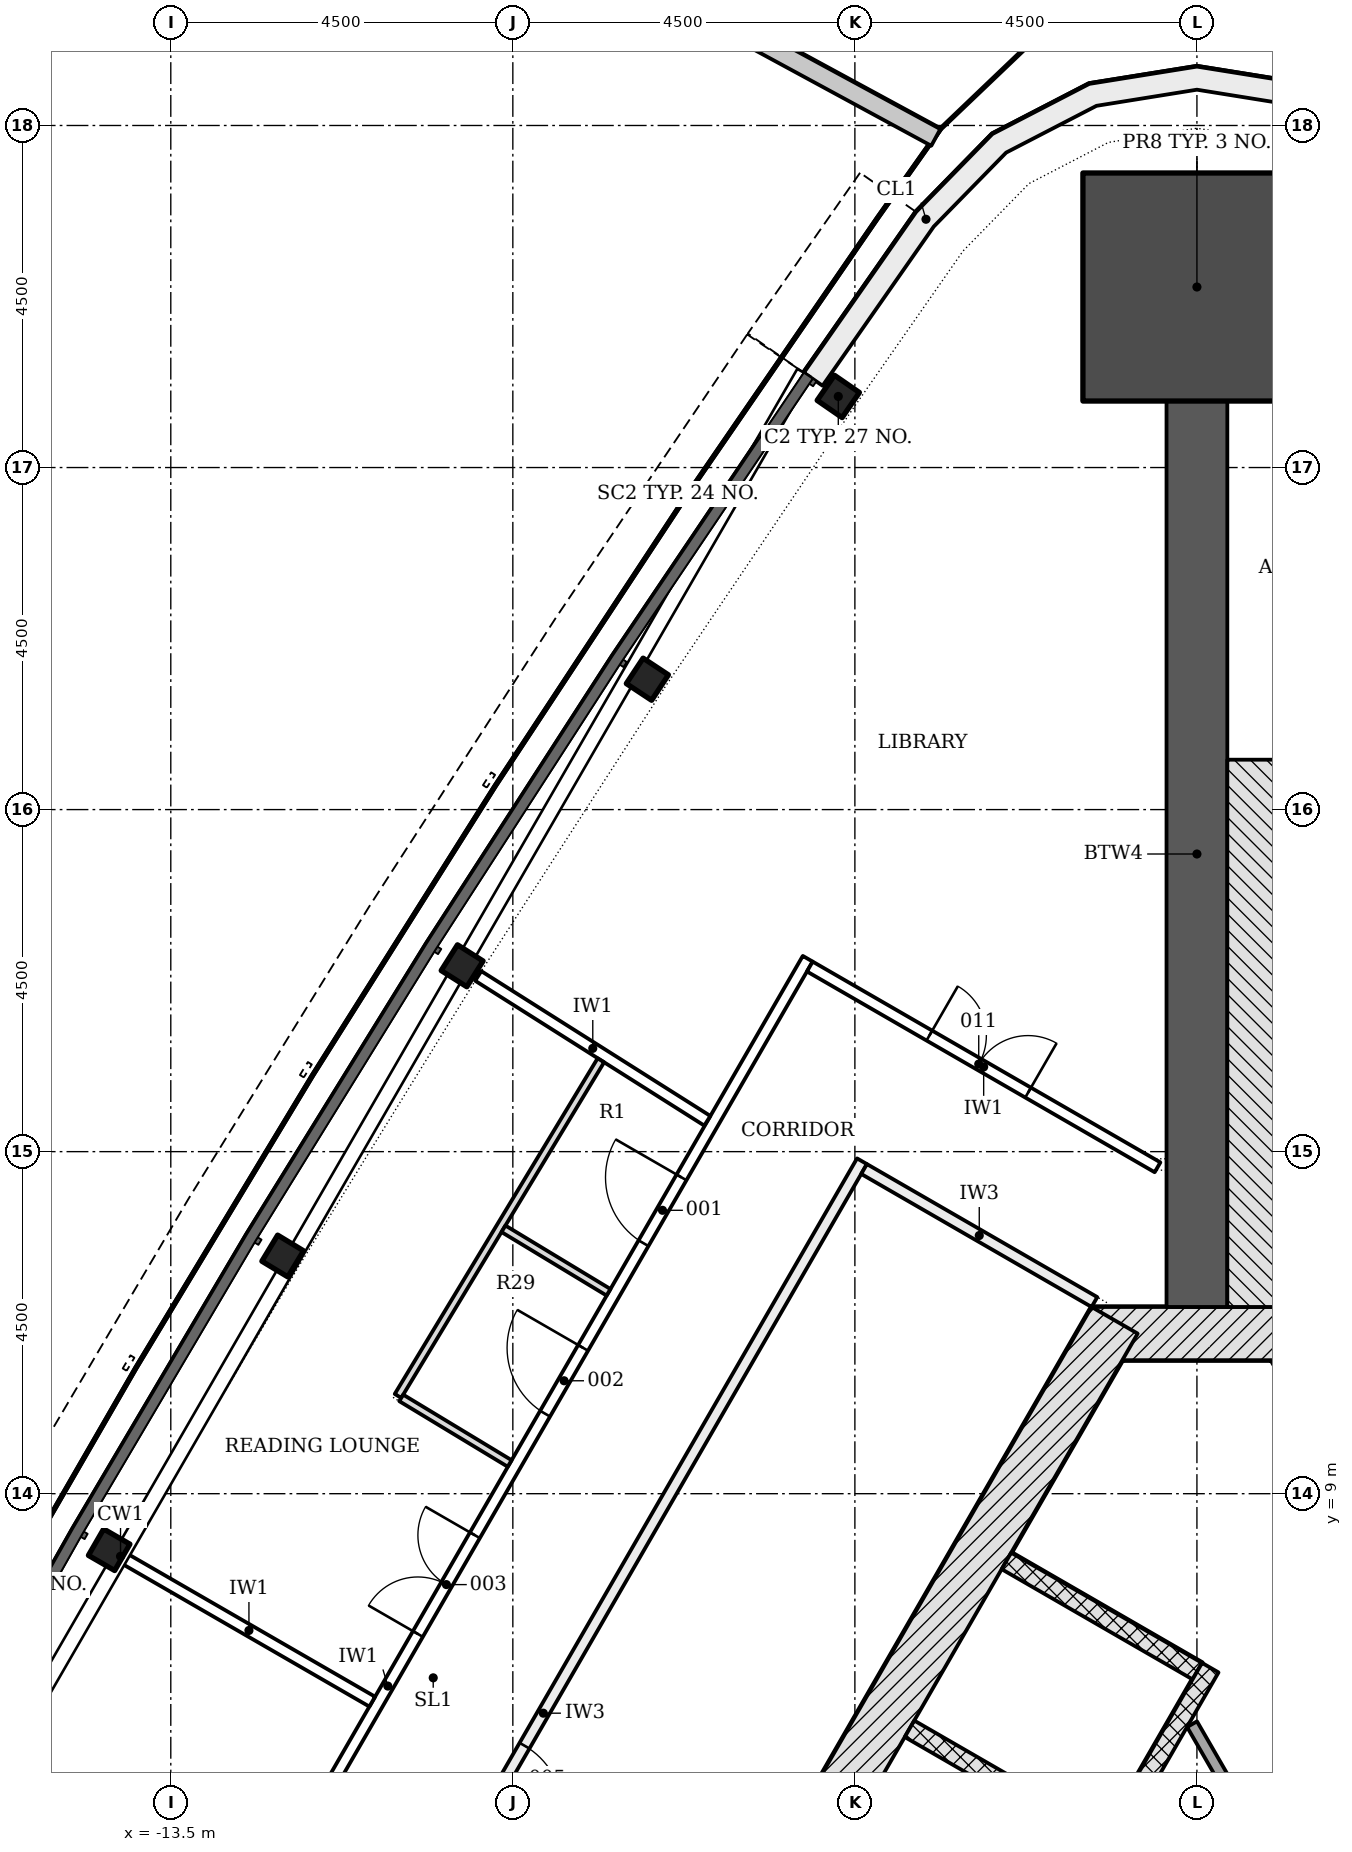
"""IFC4 building model, lengths in metres.
Left out: names, types, materials, properties, quantities, classifications, styles, units other than length and angle.
Written with IfcOpenShell. Run it as: python <this file> out.ifc"""

import sys

from ifc_helpers import new_model, si_unit, direction, frame, frame_2d, origin, origin_2d, place, context, subcontext, project, spatial, polyline, rectangle, i_section, outline, extrude, element, fill, save


model = new_model("IFC4")
c1 = context("Model", 3, precision=1e-05, world=origin(), true_north=direction((0.0, 1.0)))
c2 = subcontext(c1, "Body", "Model", "MODEL_VIEW")
j1 = project(units=[si_unit("LENGTHUNIT", "METRE"), si_unit("PLANEANGLEUNIT", "RADIAN")], contexts=[c1])
p1 = place(None, origin())
s1 = spatial("IfcSite", under=j1, at=p1, CompositionType="ELEMENT")
p2 = place(p1, origin())
s2 = spatial("IfcBuilding", under=s1, at=p2, CompositionType="ELEMENT")
p3 = place(p2, frame((0.0, 0.0, 105.9)))
s3 = spatial("IfcBuildingStorey", under=s2, at=p3, CompositionType="ELEMENT", Elevation=105.9)
p4 = place(p3, frame((10.311, -4.703, -0.2), z_axis=(0.0, 0.0, 1.0), x_axis=(-0.500001446645, 0.866024568562, 0.0)))
e1 = element("IfcWall", 1, at=p4, inside=s3, PredefinedType="SHEAR", context=c2, shape_type="SweptSolid", body=[
    extrude(rectangle(XDim=18.458, YDim=0.7, at=frame_2d((9.229, 0.0))), origin(), (0.0, 0.0, 1.0), 3.6),
])
p5 = place(p4, frame((10.5, 0.0, 0.2)))
e2 = element("IfcOpeningElement", 2, at=p5, cuts=e1, PredefinedType="OPENING", context=c2, shape_type="SweptSolid", body=[
    extrude(rectangle(XDim=1.0, YDim=2.1, at=frame_2d((0.5, 1.05))), frame((0.0, 0.36, 0.0), z_axis=(0.0, -1.0, 0.0), x_axis=(1.0, 0.0, 0.0)), (0.0, 0.0, 1.0), 0.72),
])
p6 = place(p4, frame((4.877, 0.0, 0.2)))
e3 = element("IfcOpeningElement", 3, at=p6, cuts=e1, PredefinedType="OPENING", context=c2, shape_type="SweptSolid", body=[
    extrude(rectangle(XDim=0.9, YDim=2.1, at=frame_2d((0.45, 1.05))), frame((0.0, 0.36, 0.0), z_axis=(0.0, -1.0, 0.0), x_axis=(1.0, 0.0, 0.0)), (0.0, 0.0, 1.0), 0.72),
])
p7 = place(p4, frame((14.452, 0.0, 0.2)))
e4 = element("IfcOpeningElement", 4, at=p7, cuts=e1, PredefinedType="OPENING", context=c2, shape_type="SweptSolid", body=[
    extrude(rectangle(XDim=0.9, YDim=2.1, at=frame_2d((0.45, 1.05))), frame((0.0, 0.36, 0.0), z_axis=(0.0, -1.0, 0.0), x_axis=(1.0, 0.0, 0.0)), (0.0, 0.0, 1.0), 0.72),
])
p8 = place(p3, frame((1.386, 11.106, -0.2), z_axis=(0.0, 0.0, 1.0), x_axis=(-1.0, 0.0, 0.0)))
e5 = element("IfcWall", 5, at=p8, inside=s3, PredefinedType="SHEAR", context=c2, shape_type="SweptSolid", body=[
    extrude(rectangle(XDim=2.771, YDim=0.7, at=frame_2d((1.386, 0.0))), origin(), (0.0, 0.0, 1.0), 3.6),
])
p9 = place(p3, frame((-1.083, 11.281, -0.2), z_axis=(0.0, 0.0, 1.0), x_axis=(-0.500001446645, -0.866024568562, 0.0)))
e6 = element("IfcWall", 6, at=p9, inside=s3, PredefinedType="SHEAR", context=c2, shape_type="SweptSolid", body=[
    extrude(rectangle(XDim=18.458, YDim=0.7, at=frame_2d((9.229, 0.0))), origin(), (0.0, 0.0, 1.0), 3.6),
])
p10 = place(p9, frame((8.979, 0.0, 0.2)))
e7 = element("IfcOpeningElement", 7, at=p10, cuts=e6, PredefinedType="OPENING", context=c2, shape_type="SweptSolid", body=[
    extrude(rectangle(XDim=1.2, YDim=2.1, at=frame_2d((0.6, 1.05))), frame((0.0, 0.36, 0.0), z_axis=(0.0, -1.0, 0.0), x_axis=(1.0, 0.0, 0.0)), (0.0, 0.0, 1.0), 0.72),
])
p11 = place(p9, frame((11.029, 0.0, 0.2)))
e8 = element("IfcOpeningElement", 8, at=p11, cuts=e6, PredefinedType="OPENING", context=c2, shape_type="SweptSolid", body=[
    extrude(rectangle(XDim=1.2, YDim=2.1, at=frame_2d((0.6, 1.05))), frame((0.0, 0.36, 0.0), z_axis=(0.0, -1.0, 0.0), x_axis=(1.0, 0.0, 0.0)), (0.0, 0.0, 1.0), 0.72),
])
p12 = place(p3, frame((0.0, 11.456, -0.2), z_axis=(0.0, 0.0, 1.0), x_axis=(0.0, 1.0, 0.0)))
e9 = element("IfcWall", 9, at=p12, inside=s3, PredefinedType="SHEAR", context=c2, shape_type="SweptSolid", body=[
    extrude(rectangle(XDim=11.919, YDim=0.8, at=frame_2d((5.959, 0.0))), origin(), (0.0, 0.0, 1.0), 3.6),
])
p13 = place(p3, frame((0.0, 24.875, -0.2), z_axis=(0.0, 0.0, 1.0), x_axis=(0.0, 1.0, 0.0)))
e10 = element("IfcColumn", 10, at=p13, inside=s3, PredefinedType="COLUMN", context=c2, shape_type="SweptSolid", body=[
    extrude(rectangle(XDim=3.0, YDim=3.0, at=origin_2d()), origin(), (0.0, 0.0, 1.0), 3.6),
])
for number, where, z_axis, x_axis in (
    (11, (-4.718, 23.435, -0.2), (0.0, 0.0, 1.0), (-0.568, -0.823, 0.0)),
    (12, (-7.23, 19.715, -0.2), (0.0, 0.0, 1.0), (-0.551, -0.834, 0.0)),
    (13, (-9.667, 15.945, -0.2), (0.0, 0.0, 1.0), (-0.534, -0.845, 0.0)),
    (14, (-12.027, 12.127, -0.2), (0.0, 0.0, 1.0), (-0.517, -0.856, 0.0)),
    (15, (-14.311, 8.262, -0.2), (0.0, 0.0, 1.0), (-0.5, -0.866, 0.0)),
):
    element("IfcColumn", number, at=place(p3, frame(where, z_axis=z_axis, x_axis=x_axis)), inside=s3, PredefinedType="COLUMN", context=c2, shape_type="SweptSolid", body=[
        extrude(i_section(OverallWidth=0.401, OverallDepth=0.399, WebThickness=0.025, FlangeThickness=0.04, FilletRadius=0.015, at=origin_2d()), origin(), (0.0, 0.0, 1.0), 3.6),
    ])
p14 = place(p3, origin())
e16 = element("IfcWall", 16, at=p14, inside=s3, PredefinedType="NOTDEFINED", context=c2, shape_type="SweptSolid", body=[
    extrude(outline(polyline([(5.171, 23.748), (3.694, 25.863), (2.69, 26.888), (1.417, 27.547), (0.0, 27.775), (-1.417, 27.547), (-2.69, 26.888), (-3.694, 25.863), (-5.171, 23.748), (-4.925, 23.576), (-3.462, 25.67), (-2.51, 26.644), (-1.321, 27.259), (0.0, 27.471), (1.321, 27.259), (2.51, 26.644), (3.462, 25.67), (4.925, 23.576), (5.171, 23.748)])), origin(), (0.0, 0.0, 1.0), 3.3),
])
p15 = place(p3, origin())
e17 = element("IfcWall", 17, at=p15, inside=s3, PredefinedType="PARAPET", context=c2, shape_type="SweptSolid", body=[
    extrude(outline(polyline([(-3.375, 26.953), (-5.966, 28.358), (-8.687, 29.371), (-11.446, 29.958), (-14.148, 30.099), (-16.702, 29.789), (-19.02, 29.039), (-21.024, 27.873), (-22.646, 26.333), (-23.83, 24.469), (-24.536, 22.347), (-24.74, 20.038), (-24.435, 17.62), (-23.631, 15.176), (-22.356, 12.79), (-20.653, 10.542), (-18.58, 8.509), (-16.208, 6.76), (-16.06, 6.961), (-18.418, 8.699), (-20.465, 10.707), (-22.145, 12.925), (-23.4, 15.275), (-24.19, 17.675), (-24.489, 20.042), (-24.29, 22.296), (-23.603, 24.362), (-22.452, 26.173), (-20.873, 27.672), (-18.918, 28.809), (-16.647, 29.544), (-14.139, 29.848), (-11.478, 29.709), (-8.757, 29.13), (-6.07, 28.129), (-3.495, 26.733), (-3.375, 26.953)])), origin(), (0.0, 0.0, 1.0), 1.1),
])
p16 = place(p3, frame((-2.506, 8.115, -0.2), z_axis=(0.0, 0.0, 1.0), x_axis=(0.865996321171, -0.50005036918, 0.0)))
e18 = element("IfcWall", 18, at=p16, inside=s3, PredefinedType="PARTITIONING", context=c2, shape_type="SweptSolid", body=[
    extrude(rectangle(XDim=2.9, YDim=0.25, at=frame_2d((1.45, 0.0))), origin(), (0.0, 0.0, 1.0), 3.6),
])
p17 = place(p3, frame((-3.781, 5.907, -0.2), z_axis=(0.0, 0.0, 1.0), x_axis=(0.866032775405, -0.499987231761, 0.0)))
e19 = element("IfcWall", 19, at=p17, inside=s3, PredefinedType="PARTITIONING", context=c2, shape_type="SweptSolid", body=[
    extrude(rectangle(XDim=2.9, YDim=0.25, at=frame_2d((1.45, 0.0))), origin(), (0.0, 0.0, 1.0), 3.6),
])
p18 = place(p3, frame((0.176, 6.711, 0.0), z_axis=(0.0, 0.0, 1.0), x_axis=(-0.500004227369, -0.866022963098, 0.0)))
e20 = element("IfcWall", 20, at=p18, inside=s3, PredefinedType="PARTITIONING", context=c2, shape_type="SweptSolid", body=[
    extrude(rectangle(XDim=11.8, YDim=0.25, at=frame_2d((5.9, 0.0))), origin(), (0.0, 0.0, 1.0), 3.4),
])
p19 = place(p3, frame((-2.698, 1.354, 0.0), z_axis=(0.0, 0.0, 1.0), x_axis=(0.866021157486, 0.500007354732, 0.0)))
e21 = element("IfcWall", 21, at=p19, inside=s3, PredefinedType="PARTITIONING", context=c2, shape_type="SweptSolid", body=[
    extrude(rectangle(XDim=7.888, YDim=0.15, at=frame_2d((3.944, 0.0))), origin(), (0.0, 0.0, 1.0), 3.4),
])
p20 = place(p19, frame((1.845, 0.0, 0.0)))
e22 = element("IfcOpeningElement", 22, at=p20, cuts=e21, PredefinedType="OPENING", context=c2, shape_type="SweptSolid", body=[
    extrude(rectangle(XDim=0.9, YDim=2.1, at=frame_2d((0.45, 1.05))), frame((0.0, 0.085, 0.0), z_axis=(0.0, -1.0, 0.0), x_axis=(1.0, 0.0, 0.0)), (0.0, 0.0, 1.0), 0.17),
])
p21 = place(p3, frame((1.088, 3.972, 0.0), z_axis=(0.0, 0.0, 1.0), x_axis=(-0.500116913307, 0.865957893332, 0.0)))
e23 = element("IfcWall", 23, at=p21, inside=s3, PredefinedType="PARTITIONING", context=c2, shape_type="SweptSolid", body=[
    extrude(rectangle(XDim=2.304, YDim=0.15, at=frame_2d((1.152, 0.0))), origin(), (0.0, 0.0, 1.0), 3.4),
])
p22 = place(p3, frame((0.993, 11.456, -0.2), z_axis=(0.0, 0.0, 1.0), x_axis=(0.0, 1.0, 0.0)))
e24 = element("IfcWall", 24, at=p22, inside=s3, PredefinedType="SHEAR", context=c2, shape_type="SweptSolid", body=[
    extrude(rectangle(XDim=7.2, YDim=1.186, at=frame_2d((3.6, 0.0))), origin(), (0.0, 0.0, 1.0), 3.6),
])
p23 = place(p3, frame((-16.169, -3.099, 0.0), z_axis=(0.0, 0.0, 1.0), x_axis=(0.499999805269, 0.866025516212, 0.0)))
e25 = element("IfcWall", 25, at=p23, inside=s3, PredefinedType="PARTITIONING", context=c2, shape_type="SweptSolid", body=[
    extrude(rectangle(XDim=22.097, YDim=0.15, at=frame_2d((11.049, 0.0))), origin(), (0.0, 0.0, 1.0), 2.847),
])
p24 = place(p23, frame((17.776, 0.0, 0.0)))
e26 = element("IfcOpeningElement", 26, at=p24, cuts=e25, PredefinedType="OPENING", context=c2, shape_type="SweptSolid", body=[
    extrude(rectangle(XDim=1.0, YDim=2.1, at=frame_2d((0.5, 1.05))), frame((0.0, 0.085, 0.0), z_axis=(0.0, -1.0, 0.0), x_axis=(1.0, 0.0, 0.0)), (0.0, 0.0, 1.0), 0.17),
])
p25 = place(p23, frame((15.186, 0.0, 0.0)))
e27 = element("IfcOpeningElement", 27, at=p25, cuts=e25, PredefinedType="OPENING", context=c2, shape_type="SweptSolid", body=[
    extrude(rectangle(XDim=1.0, YDim=2.1, at=frame_2d((0.5, 1.05))), frame((0.0, 0.085, 0.0), z_axis=(0.0, -1.0, 0.0), x_axis=(1.0, 0.0, 0.0)), (0.0, 0.0, 1.0), 0.17),
])
p26 = place(p23, frame((11.84, 0.0, 0.0)))
e28 = element("IfcOpeningElement", 28, at=p26, cuts=e25, PredefinedType="OPENING", context=c2, shape_type="SweptSolid", body=[
    extrude(rectangle(XDim=1.5, YDim=2.1, at=frame_2d((0.75, 1.05))), frame((0.0, 0.085, 0.0), z_axis=(0.0, -1.0, 0.0), x_axis=(1.0, 0.0, 0.0)), (0.0, 0.0, 1.0), 0.17),
])
p27 = place(p23, frame((4.503, 0.0, 0.0)))
e29 = element("IfcOpeningElement", 29, at=p27, cuts=e25, PredefinedType="OPENING", context=c2, shape_type="SweptSolid", body=[
    extrude(rectangle(XDim=1.5, YDim=2.1, at=frame_2d((0.75, 1.05))), frame((0.0, 0.085, 0.0), z_axis=(0.0, -1.0, 0.0), x_axis=(1.0, 0.0, 0.0)), (0.0, 0.0, 1.0), 0.17),
])
p28 = place(p3, frame((-4.407, 13.374, 0.0), z_axis=(0.0, 0.0, 1.0), x_axis=(-0.499997181693, -0.866027030928, 0.0)))
e30 = element("IfcWall", 30, at=p28, inside=s3, PredefinedType="PARTITIONING", context=c2, shape_type="SweptSolid", body=[
    extrude(rectangle(XDim=16.77, YDim=0.15, at=frame_2d((8.385, 0.0))), origin(), (0.0, 0.0, 1.0), 2.847),
])
p29 = place(p28, frame((8.879, 0.0, 0.0)))
e31 = element("IfcOpeningElement", 31, at=p29, cuts=e30, PredefinedType="OPENING", context=c2, shape_type="SweptSolid", body=[
    extrude(rectangle(XDim=1.0, YDim=2.1, at=frame_2d((0.5, 1.05))), frame((0.0, 0.085, 0.0), z_axis=(0.0, -1.0, 0.0), x_axis=(1.0, 0.0, 0.0)), (0.0, 0.0, 1.0), 0.17),
])
p30 = place(p3, frame((-5.093, 15.935, 0.0), z_axis=(0.0, 0.0, 1.0), x_axis=(0.866033195618, -0.499986503906, 0.0)))
e32 = element("IfcWall", 32, at=p30, inside=s3, PredefinedType="PARTITIONING", context=c2, shape_type="SweptSolid", body=[
    extrude(rectangle(XDim=5.282, YDim=0.15, at=frame_2d((2.641, 0.0))), origin(), (0.0, 0.0, 1.0), 3.4),
])
p31 = place(p30, frame((1.816, 0.0, 0.0)))
e33 = element("IfcOpeningElement", 33, at=p31, cuts=e32, PredefinedType="OPENING", context=c2, shape_type="SweptSolid", body=[
    extrude(rectangle(XDim=1.5, YDim=2.1, at=frame_2d((0.75, 1.05))), frame((0.0, 0.085, 0.0), z_axis=(0.0, -1.0, 0.0), x_axis=(1.0, 0.0, 0.0)), (0.0, 0.0, 1.0), 0.17),
])
p32 = place(p3, frame((-4.379, 13.271, 0.0), z_axis=(0.0, 0.0, 1.0), x_axis=(0.866019471182, -0.500010275428, 0.0)))
e34 = element("IfcWall", 34, at=p32, inside=s3, PredefinedType="PARTITIONING", context=c2, shape_type="SweptSolid", body=[
    extrude(rectangle(XDim=3.5, YDim=0.15, at=frame_2d((1.75, 0.0))), origin(), (0.0, 0.0, 1.0), 3.4),
])
p33 = place(p3, frame((-14.094, 8.137, 0.0), z_axis=(0.0, 0.0, 1.0), x_axis=(0.866036909293, -0.499980071345, 0.0)))
e35 = element("IfcWall", 35, at=p33, inside=s3, PredefinedType="PARTITIONING", context=c2, shape_type="SweptSolid", body=[
    extrude(rectangle(XDim=3.746, YDim=0.15, at=frame_2d((1.873, 0.0))), origin(), (0.0, 0.0, 1.0), 2.847),
])
p34 = place(p3, frame((-9.455, 15.812, 0.0), z_axis=(0.0, 0.0, 1.0), x_axis=(0.845256180865, -0.53436129043, 0.0)))
e36 = element("IfcWall", 36, at=p34, inside=s3, PredefinedType="PARTITIONING", context=c2, shape_type="SweptSolid", body=[
    extrude(rectangle(XDim=3.566, YDim=0.15, at=frame_2d((1.783, 0.0))), origin(), (0.0, 0.0, 1.0), 2.847),
])
p35 = place(p3, frame((-7.842, 14.702, 0.0), z_axis=(0.0, 0.0, 1.0), x_axis=(-0.517269453202, -0.855822594224, 0.0)))
e37 = element("IfcWall", 37, at=p35, inside=s3, PredefinedType="PARTITIONING", context=c2, shape_type="SweptSolid", body=[
    extrude(rectangle(XDim=5.16, YDim=0.1, at=frame_2d((2.58, 0.0))), origin(), (0.0, 0.0, 1.0), 2.847),
])
p36 = place(p3, frame((-10.468, 10.26, 0.0), z_axis=(0.0, 0.0, 1.0), x_axis=(0.855795319679, -0.517314576264, 0.0)))
e38 = element("IfcWall", 38, at=p36, inside=s3, PredefinedType="PARTITIONING", context=c2, shape_type="SweptSolid", body=[
    extrude(rectangle(XDim=1.667, YDim=0.1, at=frame_2d((0.833, 0.0))), origin(), (0.0, 0.0, 1.0), 3.4),
])
p37 = place(p3, frame((-9.123, 12.485, 0.0), z_axis=(0.0, 0.0, 1.0), x_axis=(0.855820717892, -0.517272557581, 0.0)))
e39 = element("IfcWall", 39, at=p37, inside=s3, PredefinedType="PARTITIONING", context=c2, shape_type="SweptSolid", body=[
    extrude(rectangle(XDim=1.615, YDim=0.1, at=frame_2d((0.807, 0.0))), origin(), (0.0, 0.0, 1.0), 3.4),
])
p38 = place(p24, origin())
e40 = element("IfcDoor", 40, at=p38, inside=s3, OperationType="SINGLE_SWING_RIGHT", PredefinedType="DOOR", context=c2, shape_type="SweptSolid", body=[
    extrude(rectangle(XDim=1.0, YDim=2.1, at=frame_2d((0.5, 1.05))), frame((0.0, 0.025, 0.0), z_axis=(0.0, -1.0, 0.0), x_axis=(1.0, 0.0, 0.0)), (0.0, 0.0, 1.0), 0.05),
])
fill(e26, e40)
p39 = place(p25, origin())
e41 = element("IfcDoor", 41, at=p39, inside=s3, OperationType="SINGLE_SWING_RIGHT", PredefinedType="DOOR", context=c2, shape_type="SweptSolid", body=[
    extrude(rectangle(XDim=1.0, YDim=2.1, at=frame_2d((0.5, 1.05))), frame((0.0, 0.025, 0.0), z_axis=(0.0, -1.0, 0.0), x_axis=(1.0, 0.0, 0.0)), (0.0, 0.0, 1.0), 0.05),
])
fill(e27, e41)
p40 = place(p26, origin())
e42 = element("IfcDoor", 42, at=p40, inside=s3, OperationType="DOUBLE_DOOR_SINGLE_SWING", PredefinedType="DOOR", context=c2, shape_type="SweptSolid", body=[
    extrude(rectangle(XDim=1.5, YDim=2.1, at=frame_2d((0.75, 1.05))), frame((0.0, 0.025, 0.0), z_axis=(0.0, -1.0, 0.0), x_axis=(1.0, 0.0, 0.0)), (0.0, 0.0, 1.0), 0.05),
])
fill(e28, e42)
p41 = place(p29, origin())
e43 = element("IfcDoor", 43, at=p41, inside=s3, OperationType="SINGLE_SWING_RIGHT", PredefinedType="DOOR", context=c2, shape_type="SweptSolid", body=[
    extrude(rectangle(XDim=1.0, YDim=2.1, at=frame_2d((0.5, 1.05))), frame((0.0, 0.025, 0.0), z_axis=(0.0, -1.0, 0.0), x_axis=(1.0, 0.0, 0.0)), (0.0, 0.0, 1.0), 0.05),
])
fill(e31, e43)
p42 = place(p31, origin())
e44 = element("IfcDoor", 44, at=p42, inside=s3, OperationType="DOUBLE_DOOR_SINGLE_SWING", PredefinedType="DOOR", context=c2, shape_type="SweptSolid", body=[
    extrude(rectangle(XDim=1.5, YDim=2.1, at=frame_2d((0.75, 1.05))), frame((0.0, 0.025, 0.0), z_axis=(0.0, -1.0, 0.0), x_axis=(1.0, 0.0, 0.0)), (0.0, 0.0, 1.0), 0.05),
])
fill(e33, e44)
save(model, sys.argv[1])
